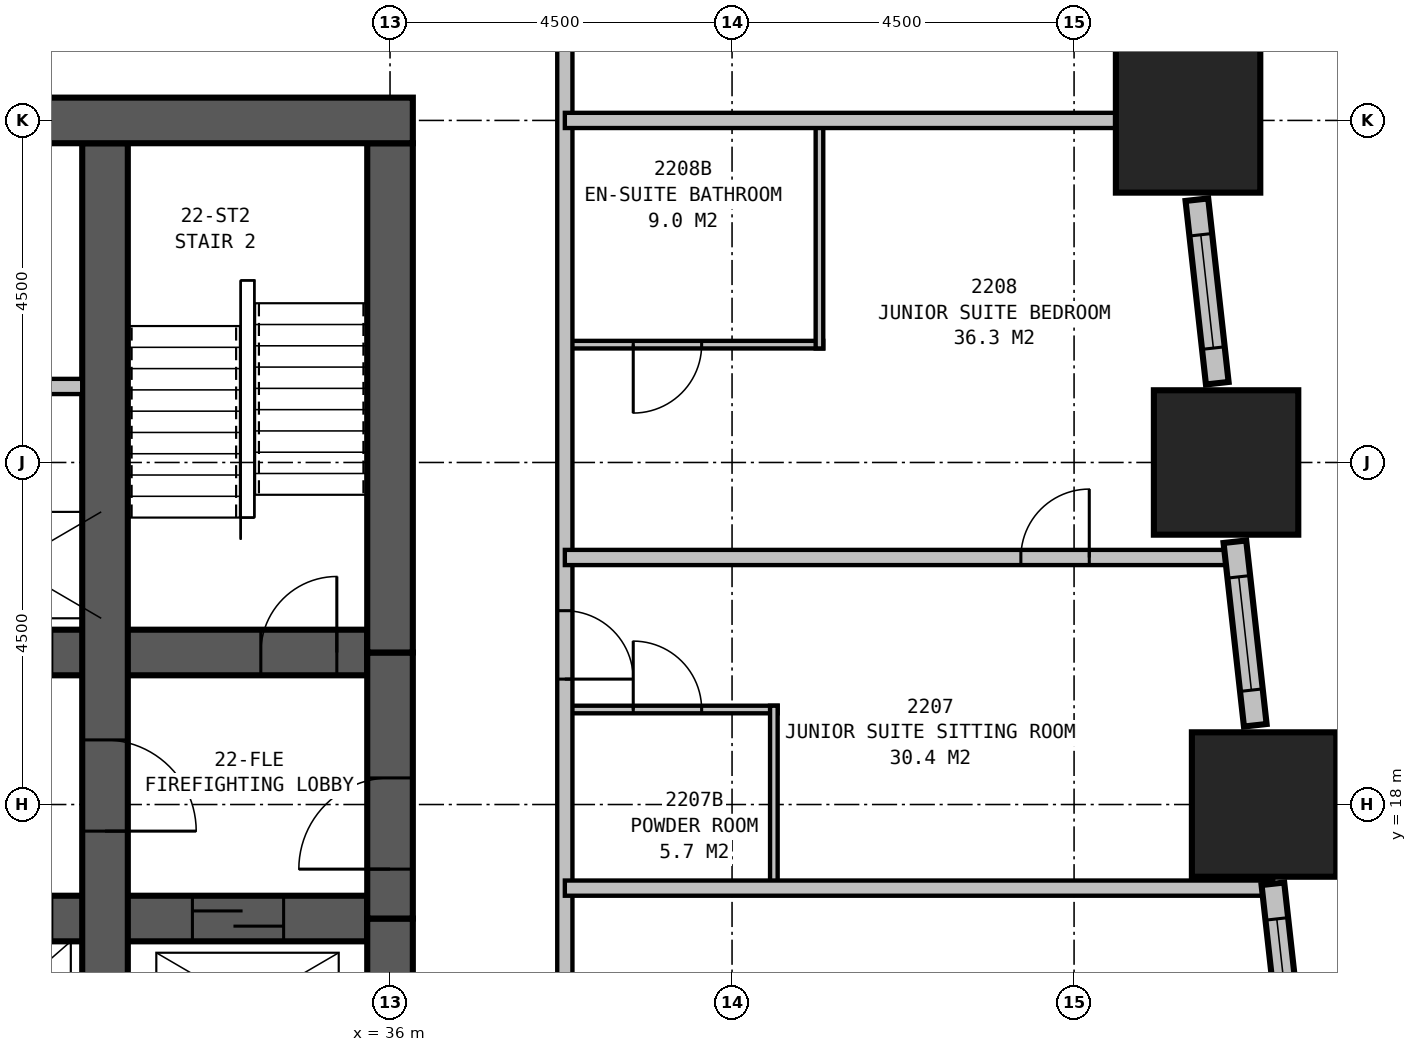
"""IFC4 building model, lengths in metres.
Left out: names, types, materials, properties, quantities, classifications, styles, units other than length and angle.
Written with IfcOpenShell. Run it as: python <this file> out.ifc"""

import sys

from ifc_helpers import new_model, si_unit, direction, frame, frame_2d, origin, origin_2d, place, context, subcontext, project, spatial, rectangle, extrude, element, fill, save


model = new_model("IFC4")
c1 = context("Model", 3, precision=1e-05, world=origin(), true_north=direction((0.0, 1.0)))
c2 = subcontext(c1, "Body", "Model", "MODEL_VIEW")
j1 = project(units=[si_unit("LENGTHUNIT", "METRE"), si_unit("PLANEANGLEUNIT", "RADIAN")], contexts=[c1])
p1 = place(None, origin())
s1 = spatial("IfcSite", under=j1, at=p1, CompositionType="ELEMENT")
p2 = place(p1, origin())
s2 = spatial("IfcBuilding", under=s1, at=p2, CompositionType="ELEMENT")
p3 = place(p2, frame((0.0, 0.0, 89.9)))
s3 = spatial("IfcBuildingStorey", under=s2, at=p3, CompositionType="ELEMENT", Elevation=89.9)
for number, where, z_axis, x_axis in (
    (1, (47.5, 18.0, 0.0), (0.0, 0.0, 1.0), (1.0, 0.0, 0.0)),
    (2, (47.0, 22.5, 0.0), (0.0, 0.0, 1.0), (1.0, 0.0, 0.0)),
    (3, (46.5, 27.0, 0.0), (0.0, 0.0, 1.0), (1.0, 0.0, 0.0)),
):
    element("IfcColumn", number, at=place(p3, frame(where, z_axis=z_axis, x_axis=x_axis)), inside=s3, PredefinedType="COLUMN", context=c2, shape_type="SweptSolid", body=[
        extrude(rectangle(XDim=1.9, YDim=1.9, at=origin_2d()), origin(), (0.0, 0.0, 1.0), 3.5),
    ])
p4 = place(p3, frame((36.3, 27.0, 0.0), z_axis=(0.0, 0.0, 1.0), x_axis=(-1.0, 0.0, 0.0)))
e4 = element("IfcWall", 4, at=p4, inside=s3, PredefinedType="SHEAR", context=c2, shape_type="SweptSolid", body=[
    extrude(rectangle(XDim=23.1, YDim=0.6, at=frame_2d((11.55, 0.0))), origin(), (0.0, 0.0, 1.0), 3.5),
])
p5 = place(p4, frame((17.05, 0.0, 0.0)))
e5 = element("IfcOpeningElement", 5, at=p5, cuts=e4, PredefinedType="OPENING", context=c2, shape_type="SweptSolid", body=[
    extrude(rectangle(XDim=1.0, YDim=2.1, at=frame_2d((0.5, 1.05))), frame((0.0, 0.31, 0.0), z_axis=(0.0, -1.0, 0.0), x_axis=(1.0, 0.0, 0.0)), (0.0, 0.0, 1.0), 0.62),
])
p6 = place(p4, frame((12.05, 0.0, 0.0)))
e6 = element("IfcOpeningElement", 6, at=p6, cuts=e4, PredefinedType="OPENING", context=c2, shape_type="SweptSolid", body=[
    extrude(rectangle(XDim=1.0, YDim=2.1, at=frame_2d((0.5, 1.05))), frame((0.0, 0.31, 0.0), z_axis=(0.0, -1.0, 0.0), x_axis=(1.0, 0.0, 0.0)), (0.0, 0.0, 1.0), 0.62),
])
p7 = place(p4, frame((7.05, 0.0, 0.0)))
e7 = element("IfcOpeningElement", 7, at=p7, cuts=e4, PredefinedType="OPENING", context=c2, shape_type="SweptSolid", body=[
    extrude(rectangle(XDim=1.0, YDim=2.1, at=frame_2d((0.5, 1.05))), frame((0.0, 0.31, 0.0), z_axis=(0.0, -1.0, 0.0), x_axis=(1.0, 0.0, 0.0)), (0.0, 0.0, 1.0), 0.62),
])
p8 = place(p3, frame((32.25, 13.8, 0.0), z_axis=(0.0, 0.0, 1.0), x_axis=(0.0, 1.0, 0.0)))
e8 = element("IfcWall", 8, at=p8, inside=s3, PredefinedType="SHEAR", context=c2, shape_type="SweptSolid", body=[
    extrude(rectangle(XDim=12.9, YDim=0.6, at=frame_2d((6.45, 0.0))), origin(), (0.0, 0.0, 1.0), 3.5),
])
p9 = place(p8, frame((5.05, 0.0, 0.0), z_axis=(0.0, 0.0, 1.0), x_axis=(-1.0, 0.0, 0.0)))
e9 = element("IfcOpeningElement", 9, at=p9, cuts=e8, PredefinedType="OPENING", context=c2, shape_type="SweptSolid", body=[
    extrude(rectangle(XDim=1.2, YDim=2.1, at=frame_2d((0.6, 1.05))), frame((0.0, 0.31, 0.0), z_axis=(0.0, -1.0, 0.0), x_axis=(1.0, 0.0, 0.0)), (0.0, 0.0, 1.0), 0.62),
])
p10 = place(p3, frame((13.8, 16.5, 0.0), z_axis=(0.0, 0.0, 1.0), x_axis=(1.0, 0.0, 0.0)))
e10 = element("IfcWall", 10, at=p10, inside=s3, PredefinedType="SHEAR", context=c2, shape_type="SweptSolid", body=[
    extrude(rectangle(XDim=21.9, YDim=0.6, at=frame_2d((10.95, 0.0))), origin(), (0.0, 0.0, 1.0), 3.5),
])
p11 = place(p10, frame((11.65, 0.0, 0.0)))
e11 = element("IfcOpeningElement", 11, at=p11, cuts=e10, PredefinedType="OPENING", context=c2, shape_type="SweptSolid", body=[
    extrude(rectangle(XDim=1.1, YDim=2.1, at=frame_2d((0.55, 1.05))), frame((0.0, 0.31, 0.0), z_axis=(0.0, -1.0, 0.0), x_axis=(1.0, 0.0, 0.0)), (0.0, 0.0, 1.0), 0.62),
])
p12 = place(p10, frame((14.15, 0.0, 0.0)))
e12 = element("IfcOpeningElement", 12, at=p12, cuts=e10, PredefinedType="OPENING", context=c2, shape_type="SweptSolid", body=[
    extrude(rectangle(XDim=1.1, YDim=2.1, at=frame_2d((0.55, 1.05))), frame((0.0, 0.31, 0.0), z_axis=(0.0, -1.0, 0.0), x_axis=(1.0, 0.0, 0.0)), (0.0, 0.0, 1.0), 0.62),
])
p13 = place(p10, frame((16.65, 0.0, 0.0)))
e13 = element("IfcOpeningElement", 13, at=p13, cuts=e10, PredefinedType="OPENING", context=c2, shape_type="SweptSolid", body=[
    extrude(rectangle(XDim=1.1, YDim=2.1, at=frame_2d((0.55, 1.05))), frame((0.0, 0.31, 0.0), z_axis=(0.0, -1.0, 0.0), x_axis=(1.0, 0.0, 0.0)), (0.0, 0.0, 1.0), 0.62),
])
p14 = place(p10, frame((5.75, 0.0, 0.0), z_axis=(0.0, 0.0, 1.0), x_axis=(-1.0, 0.0, 0.0)))
e14 = element("IfcOpeningElement", 14, at=p14, cuts=e10, PredefinedType="OPENING", context=c2, shape_type="SweptSolid", body=[
    extrude(rectangle(XDim=1.0, YDim=2.1, at=frame_2d((0.5, 1.05))), frame((0.0, 0.31, 0.0), z_axis=(0.0, -1.0, 0.0), x_axis=(1.0, 0.0, 0.0)), (0.0, 0.0, 1.0), 0.62),
])
p15 = place(p10, frame((10.2, 0.0, 0.0), z_axis=(0.0, 0.0, 1.0), x_axis=(-1.0, 0.0, 0.0)))
e15 = element("IfcOpeningElement", 15, at=p15, cuts=e10, PredefinedType="OPENING", context=c2, shape_type="SweptSolid", body=[
    extrude(rectangle(XDim=1.0, YDim=2.1, at=frame_2d((0.5, 1.05))), frame((0.0, 0.31, 0.0), z_axis=(0.0, -1.0, 0.0), x_axis=(1.0, 0.0, 0.0)), (0.0, 0.0, 1.0), 0.62),
])
p16 = place(p10, frame((0.6, 0.0, 0.0)))
e16 = element("IfcOpeningElement", 16, at=p16, cuts=e10, PredefinedType="OPENING", context=c2, shape_type="SweptSolid", body=[
    extrude(rectangle(XDim=1.2, YDim=2.1, at=frame_2d((0.6, 1.05))), frame((0.0, 0.31, 0.0), z_axis=(0.0, -1.0, 0.0), x_axis=(1.0, 0.0, 0.0)), (0.0, 0.0, 1.0), 0.62),
])
p17 = place(p10, frame((19.6, 0.0, 0.0)))
e17 = element("IfcOpeningElement", 17, at=p17, cuts=e10, PredefinedType="OPENING", context=c2, shape_type="SweptSolid", body=[
    extrude(rectangle(XDim=1.2, YDim=2.1, at=frame_2d((0.6, 1.05))), frame((0.0, 0.31, 0.0), z_axis=(0.0, -1.0, 0.0), x_axis=(1.0, 0.0, 0.0)), (0.0, 0.0, 1.0), 0.62),
])
p18 = place(p3, frame((13.8, 20.0, 0.0), z_axis=(0.0, 0.0, 1.0), x_axis=(1.0, 0.0, 0.0)))
e18 = element("IfcWall", 18, at=p18, inside=s3, PredefinedType="SHEAR", context=c2, shape_type="SweptSolid", body=[
    extrude(rectangle(XDim=21.9, YDim=0.6, at=frame_2d((10.95, 0.0))), origin(), (0.0, 0.0, 1.0), 3.5),
])
p19 = place(p18, frame((0.5, 0.0, 0.0)))
e19 = element("IfcOpeningElement", 19, at=p19, cuts=e18, PredefinedType="OPENING", context=c2, shape_type="SweptSolid", body=[
    extrude(rectangle(XDim=1.0, YDim=2.1, at=frame_2d((0.5, 1.05))), frame((0.0, 0.31, 0.0), z_axis=(0.0, -1.0, 0.0), x_axis=(1.0, 0.0, 0.0)), (0.0, 0.0, 1.0), 0.62),
])
p20 = place(p18, frame((20.5, 0.0, 0.0)))
e20 = element("IfcOpeningElement", 20, at=p20, cuts=e18, PredefinedType="OPENING", context=c2, shape_type="SweptSolid", body=[
    extrude(rectangle(XDim=1.0, YDim=2.1, at=frame_2d((0.5, 1.05))), frame((0.0, 0.31, 0.0), z_axis=(0.0, -1.0, 0.0), x_axis=(1.0, 0.0, 0.0)), (0.0, 0.0, 1.0), 0.62),
])
p21 = place(p18, frame((16.65, 0.0, 0.0)))
e21 = element("IfcOpeningElement", 21, at=p21, cuts=e18, PredefinedType="OPENING", context=c2, shape_type="SweptSolid", body=[
    extrude(rectangle(XDim=1.1, YDim=2.1, at=frame_2d((0.55, 1.05))), frame((0.0, 0.31, 0.0), z_axis=(0.0, -1.0, 0.0), x_axis=(1.0, 0.0, 0.0)), (0.0, 0.0, 1.0), 0.62),
])
p22 = place(p3, frame((36.0, 13.8, 0.0), z_axis=(0.0, 0.0, 1.0), x_axis=(0.0, 1.0, 0.0)))
e22 = element("IfcWall", 22, at=p22, inside=s3, PredefinedType="SHEAR", context=c2, shape_type="SweptSolid", body=[
    extrude(rectangle(XDim=2.7, YDim=0.6, at=frame_2d((1.35, 0.0))), origin(), (0.0, 0.0, 1.0), 3.5),
])
p23 = place(p3, frame((36.0, 16.5, 0.0), z_axis=(0.0, 0.0, 1.0), x_axis=(0.0, 1.0, 0.0)))
e23 = element("IfcWall", 23, at=p23, inside=s3, PredefinedType="SHEAR", context=c2, shape_type="SweptSolid", body=[
    extrude(rectangle(XDim=3.5, YDim=0.6, at=frame_2d((1.75, 0.0))), origin(), (0.0, 0.0, 1.0), 3.5),
])
p24 = place(p23, frame((0.65, 0.0, 0.0)))
e24 = element("IfcOpeningElement", 24, at=p24, cuts=e23, PredefinedType="OPENING", context=c2, shape_type="SweptSolid", body=[
    extrude(rectangle(XDim=1.2, YDim=2.1, at=frame_2d((0.6, 1.05))), frame((0.0, 0.31, 0.0), z_axis=(0.0, -1.0, 0.0), x_axis=(1.0, 0.0, 0.0)), (0.0, 0.0, 1.0), 0.62),
])
p25 = place(p3, frame((36.0, 20.0, 0.0), z_axis=(0.0, 0.0, 1.0), x_axis=(0.0, 1.0, 0.0)))
e25 = element("IfcWall", 25, at=p25, inside=s3, PredefinedType="SHEAR", context=c2, shape_type="SweptSolid", body=[
    extrude(rectangle(XDim=6.7, YDim=0.6, at=frame_2d((3.35, 0.0))), origin(), (0.0, 0.0, 1.0), 3.5),
])
p26 = place(p3, frame((47.884, 14.543, 0.0), z_axis=(0.0, 0.0, 1.0), x_axis=(-0.110343286306, 0.993893535127, 0.0)))
e26 = element("IfcWall", 26, at=p26, inside=s3, PredefinedType="STANDARD", context=c2, shape_type="SweptSolid", body=[
    extrude(rectangle(XDim=2.429, YDim=0.3, at=frame_2d((1.215, 0.0))), origin(), (0.0, 0.0, 1.0), 2.15),
])
p27 = place(p26, frame((0.465, 0.0, 0.5)))
e27 = element("IfcOpeningElement", 27, at=p27, cuts=e26, PredefinedType="OPENING", context=c2, shape_type="SweptSolid", body=[
    extrude(rectangle(XDim=1.5, YDim=1.5, at=frame_2d((0.75, 0.75))), frame((0.0, 0.16, 0.0), z_axis=(0.0, -1.0, 0.0), x_axis=(1.0, 0.0, 0.0)), (0.0, 0.0, 1.0), 0.32),
])
p28 = place(p3, frame((47.384, 19.043, 0.0), z_axis=(0.0, 0.0, 1.0), x_axis=(-0.110343286306, 0.993893535127, 0.0)))
e28 = element("IfcWall", 28, at=p28, inside=s3, PredefinedType="STANDARD", context=c2, shape_type="SweptSolid", body=[
    extrude(rectangle(XDim=2.429, YDim=0.3, at=frame_2d((1.215, 0.0))), origin(), (0.0, 0.0, 1.0), 2.15),
])
p29 = place(p28, frame((0.465, 0.0, 0.5)))
e29 = element("IfcOpeningElement", 29, at=p29, cuts=e28, PredefinedType="OPENING", context=c2, shape_type="SweptSolid", body=[
    extrude(rectangle(XDim=1.5, YDim=1.5, at=frame_2d((0.75, 0.75))), frame((0.0, 0.16, 0.0), z_axis=(0.0, -1.0, 0.0), x_axis=(1.0, 0.0, 0.0)), (0.0, 0.0, 1.0), 0.32),
])
p30 = place(p3, frame((46.884, 23.543, 0.0), z_axis=(0.0, 0.0, 1.0), x_axis=(-0.110343286306, 0.993893535127, 0.0)))
e30 = element("IfcWall", 30, at=p30, inside=s3, PredefinedType="STANDARD", context=c2, shape_type="SweptSolid", body=[
    extrude(rectangle(XDim=2.429, YDim=0.3, at=frame_2d((1.215, 0.0))), origin(), (0.0, 0.0, 1.0), 2.15),
])
p31 = place(p30, frame((0.465, 0.0, 0.5)))
e31 = element("IfcOpeningElement", 31, at=p31, cuts=e30, PredefinedType="OPENING", context=c2, shape_type="SweptSolid", body=[
    extrude(rectangle(XDim=1.5, YDim=1.5, at=frame_2d((0.75, 0.75))), frame((0.0, 0.16, 0.0), z_axis=(0.0, -1.0, 0.0), x_axis=(1.0, 0.0, 0.0)), (0.0, 0.0, 1.0), 0.32),
])
p32 = place(p3, frame((38.3, 10.6, 0.0), z_axis=(0.0, 0.0, 1.0), x_axis=(0.0, 1.0, 0.0)))
e32 = element("IfcWall", 32, at=p32, inside=s3, PredefinedType="PARTITIONING", context=c2, shape_type="SweptSolid", body=[
    extrude(rectangle(XDim=19.3, YDim=0.2, at=frame_2d((9.65, 0.0))), origin(), (0.0, 0.0, 1.0), 3.25),
])
p33 = place(p32, frame((4.65, 0.0, 0.0), z_axis=(0.0, 0.0, 1.0), x_axis=(-1.0, 0.0, 0.0)))
e33 = element("IfcOpeningElement", 33, at=p33, cuts=e32, PredefinedType="OPENING", context=c2, shape_type="SweptSolid", body=[
    extrude(rectangle(XDim=1.0, YDim=2.1, at=frame_2d((0.5, 1.05))), frame((0.0, 0.11, 0.0), z_axis=(0.0, -1.0, 0.0), x_axis=(1.0, 0.0, 0.0)), (0.0, 0.0, 1.0), 0.22),
])
p34 = place(p32, frame((9.95, 0.0, 0.0), z_axis=(0.0, 0.0, 1.0), x_axis=(-1.0, 0.0, 0.0)))
e34 = element("IfcOpeningElement", 34, at=p34, cuts=e32, PredefinedType="OPENING", context=c2, shape_type="SweptSolid", body=[
    extrude(rectangle(XDim=0.9, YDim=2.1, at=frame_2d((0.45, 1.05))), frame((0.0, 0.11, 0.0), z_axis=(0.0, -1.0, 0.0), x_axis=(1.0, 0.0, 0.0)), (0.0, 0.0, 1.0), 0.22),
])
p35 = place(p3, frame((38.3, 16.9, 0.0), z_axis=(0.0, 0.0, 1.0), x_axis=(1.0, 0.0, 0.0)))
e35 = element("IfcWall", 35, at=p35, inside=s3, PredefinedType="PARTITIONING", context=c2, shape_type="SweptSolid", body=[
    extrude(rectangle(XDim=9.321, YDim=0.2, at=frame_2d((4.661, 0.0))), origin(), (0.0, 0.0, 1.0), 3.25),
])
p36 = place(p3, frame((38.3, 21.25, 0.0), z_axis=(0.0, 0.0, 1.0), x_axis=(1.0, 0.0, 0.0)))
e36 = element("IfcWall", 36, at=p36, inside=s3, PredefinedType="PARTITIONING", context=c2, shape_type="SweptSolid", body=[
    extrude(rectangle(XDim=8.838, YDim=0.2, at=frame_2d((4.419, 0.0))), origin(), (0.0, 0.0, 1.0), 3.25),
])
p37 = place(p36, frame((6.0, 0.0, 0.0)))
e37 = element("IfcOpeningElement", 37, at=p37, cuts=e36, PredefinedType="OPENING", context=c2, shape_type="SweptSolid", body=[
    extrude(rectangle(XDim=0.9, YDim=2.1, at=frame_2d((0.45, 1.05))), frame((0.0, 0.11, 0.0), z_axis=(0.0, -1.0, 0.0), x_axis=(1.0, 0.0, 0.0)), (0.0, 0.0, 1.0), 0.22),
])
p38 = place(p3, frame((41.05, 16.9, 0.0), z_axis=(0.0, 0.0, 1.0), x_axis=(0.0, 1.0, 0.0)))
e38 = element("IfcWall", 38, at=p38, inside=s3, PredefinedType="PLUMBINGWALL", context=c2, shape_type="SweptSolid", body=[
    extrude(rectangle(XDim=2.4, YDim=0.1, at=frame_2d((1.2, 0.0))), origin(), (0.0, 0.0, 1.0), 3.25),
])
p39 = place(p3, frame((38.3, 19.25, 0.0), z_axis=(0.0, 0.0, 1.0), x_axis=(1.0, 0.0, 0.0)))
e39 = element("IfcWall", 39, at=p39, inside=s3, PredefinedType="PLUMBINGWALL", context=c2, shape_type="SweptSolid", body=[
    extrude(rectangle(XDim=2.8, YDim=0.1, at=frame_2d((1.4, 0.0))), origin(), (0.0, 0.0, 1.0), 3.25),
])
p40 = place(p39, frame((0.9, 0.0, 0.0)))
e40 = element("IfcOpeningElement", 40, at=p40, cuts=e39, PredefinedType="OPENING", context=c2, shape_type="SweptSolid", body=[
    extrude(rectangle(XDim=0.9, YDim=2.1, at=frame_2d((0.45, 1.05))), frame((0.0, 0.06, 0.0), z_axis=(0.0, -1.0, 0.0), x_axis=(1.0, 0.0, 0.0)), (0.0, 0.0, 1.0), 0.12),
])
p41 = place(p3, frame((41.65, 24.0, 0.0), z_axis=(0.0, 0.0, 1.0), x_axis=(0.0, 1.0, 0.0)))
e41 = element("IfcWall", 41, at=p41, inside=s3, PredefinedType="PLUMBINGWALL", context=c2, shape_type="SweptSolid", body=[
    extrude(rectangle(XDim=3.0, YDim=0.1, at=frame_2d((1.5, 0.0))), origin(), (0.0, 0.0, 1.0), 3.25),
])
p42 = place(p3, frame((38.3, 24.05, 0.0), z_axis=(0.0, 0.0, 1.0), x_axis=(1.0, 0.0, 0.0)))
e42 = element("IfcWall", 42, at=p42, inside=s3, PredefinedType="PLUMBINGWALL", context=c2, shape_type="SweptSolid", body=[
    extrude(rectangle(XDim=3.4, YDim=0.1, at=frame_2d((1.7, 0.0))), origin(), (0.0, 0.0, 1.0), 3.25),
])
p43 = place(p42, frame((1.8, 0.0, 0.0), z_axis=(0.0, 0.0, 1.0), x_axis=(-1.0, 0.0, 0.0)))
e43 = element("IfcOpeningElement", 43, at=p43, cuts=e42, PredefinedType="OPENING", context=c2, shape_type="SweptSolid", body=[
    extrude(rectangle(XDim=0.9, YDim=2.1, at=frame_2d((0.45, 1.05))), frame((0.0, 0.06, 0.0), z_axis=(0.0, -1.0, 0.0), x_axis=(1.0, 0.0, 0.0)), (0.0, 0.0, 1.0), 0.12),
])
p44 = place(p3, frame((38.3, 27.0, 0.0), z_axis=(0.0, 0.0, 1.0), x_axis=(1.0, 0.0, 0.0)))
e44 = element("IfcWall", 44, at=p44, inside=s3, PredefinedType="PARTITIONING", context=c2, shape_type="SweptSolid", body=[
    extrude(rectangle(XDim=7.977, YDim=0.2, at=frame_2d((3.988, 0.0))), origin(), (0.0, 0.0, 1.0), 1.95),
])
p45 = place(p3, frame((17.55, 23.5, 0.0), z_axis=(0.0, 0.0, 1.0), x_axis=(1.0, 0.0, 0.0)))
e45 = element("IfcWall", 45, at=p45, inside=s3, PredefinedType="PARTITIONING", context=c2, shape_type="SweptSolid", body=[
    extrude(rectangle(XDim=14.4, YDim=0.2, at=frame_2d((7.2, 0.0))), origin(), (0.0, 0.0, 1.0), 3.25),
])
p46 = place(p45, frame((6.45, 0.0, 0.0), z_axis=(0.0, 0.0, 1.0), x_axis=(-1.0, 0.0, 0.0)))
e46 = element("IfcOpeningElement", 46, at=p46, cuts=e45, PredefinedType="OPENING", context=c2, shape_type="SweptSolid", body=[
    extrude(rectangle(XDim=1.0, YDim=2.1, at=frame_2d((0.5, 1.05))), frame((0.0, 0.11, 0.0), z_axis=(0.0, -1.0, 0.0), x_axis=(1.0, 0.0, 0.0)), (0.0, 0.0, 1.0), 0.22),
])
p47 = place(p45, frame((7.95, 0.0, 0.0)))
e47 = element("IfcOpeningElement", 47, at=p47, cuts=e45, PredefinedType="OPENING", context=c2, shape_type="SweptSolid", body=[
    extrude(rectangle(XDim=1.0, YDim=2.1, at=frame_2d((0.5, 1.05))), frame((0.0, 0.11, 0.0), z_axis=(0.0, -1.0, 0.0), x_axis=(1.0, 0.0, 0.0)), (0.0, 0.0, 1.0), 0.22),
])
p48 = place(p27, origin())
e48 = element("IfcWindow", 48, at=p48, inside=s3, PartitioningType="SINGLE_PANEL", PredefinedType="WINDOW", context=c2, shape_type="SweptSolid", body=[
    extrude(rectangle(XDim=1.5, YDim=1.5, at=frame_2d((0.75, 0.75))), frame((0.0, 0.03, 0.0), z_axis=(0.0, -1.0, 0.0), x_axis=(1.0, 0.0, 0.0)), (0.0, 0.0, 1.0), 0.06),
])
fill(e27, e48)
p49 = place(p29, origin())
e49 = element("IfcWindow", 49, at=p49, inside=s3, PartitioningType="SINGLE_PANEL", PredefinedType="WINDOW", context=c2, shape_type="SweptSolid", body=[
    extrude(rectangle(XDim=1.5, YDim=1.5, at=frame_2d((0.75, 0.75))), frame((0.0, 0.03, 0.0), z_axis=(0.0, -1.0, 0.0), x_axis=(1.0, 0.0, 0.0)), (0.0, 0.0, 1.0), 0.06),
])
fill(e29, e49)
p50 = place(p31, origin())
e50 = element("IfcWindow", 50, at=p50, inside=s3, PartitioningType="SINGLE_PANEL", PredefinedType="WINDOW", context=c2, shape_type="SweptSolid", body=[
    extrude(rectangle(XDim=1.5, YDim=1.5, at=frame_2d((0.75, 0.75))), frame((0.0, 0.03, 0.0), z_axis=(0.0, -1.0, 0.0), x_axis=(1.0, 0.0, 0.0)), (0.0, 0.0, 1.0), 0.06),
])
fill(e31, e50)
p51 = place(p34, origin())
e51 = element("IfcDoor", 51, at=p51, inside=s3, OperationType="SINGLE_SWING_RIGHT", PredefinedType="DOOR", context=c2, shape_type="SweptSolid", body=[
    extrude(rectangle(XDim=0.9, YDim=2.1, at=frame_2d((0.45, 1.05))), frame((0.0, 0.025, 0.0), z_axis=(0.0, -1.0, 0.0), x_axis=(1.0, 0.0, 0.0)), (0.0, 0.0, 1.0), 0.05),
])
fill(e34, e51)
p52 = place(p37, origin())
e52 = element("IfcDoor", 52, at=p52, inside=s3, OperationType="SINGLE_SWING_RIGHT", PredefinedType="DOOR", context=c2, shape_type="SweptSolid", body=[
    extrude(rectangle(XDim=0.9, YDim=2.1, at=frame_2d((0.45, 1.05))), frame((0.0, 0.025, 0.0), z_axis=(0.0, -1.0, 0.0), x_axis=(1.0, 0.0, 0.0)), (0.0, 0.0, 1.0), 0.05),
])
fill(e37, e52)
p53 = place(p40, origin())
e53 = element("IfcDoor", 53, at=p53, inside=s3, OperationType="SINGLE_SWING_LEFT", PredefinedType="DOOR", context=c2, shape_type="SweptSolid", body=[
    extrude(rectangle(XDim=0.9, YDim=2.1, at=frame_2d((0.45, 1.05))), frame((0.0, 0.025, 0.0), z_axis=(0.0, -1.0, 0.0), x_axis=(1.0, 0.0, 0.0)), (0.0, 0.0, 1.0), 0.05),
])
fill(e40, e53)
p54 = place(p43, origin())
e54 = element("IfcDoor", 54, at=p54, inside=s3, OperationType="SINGLE_SWING_RIGHT", PredefinedType="DOOR", context=c2, shape_type="SweptSolid", body=[
    extrude(rectangle(XDim=0.9, YDim=2.1, at=frame_2d((0.45, 1.05))), frame((0.0, 0.025, 0.0), z_axis=(0.0, -1.0, 0.0), x_axis=(1.0, 0.0, 0.0)), (0.0, 0.0, 1.0), 0.05),
])
fill(e43, e54)
p55 = place(p24, origin())
e55 = element("IfcDoor", 55, at=p55, inside=s3, OperationType="SINGLE_SWING_LEFT", PredefinedType="DOOR", context=c2, shape_type="SweptSolid", body=[
    extrude(rectangle(XDim=1.2, YDim=2.1, at=frame_2d((0.6, 1.05))), frame((0.0, 0.3, 0.0), z_axis=(0.0, -1.0, 0.0), x_axis=(1.0, 0.0, 0.0)), (0.0, 0.0, 1.0), 0.6),
])
fill(e24, e55)
p56 = place(p9, origin())
e56 = element("IfcDoor", 56, at=p56, inside=s3, OperationType="SINGLE_SWING_RIGHT", PredefinedType="DOOR", context=c2, shape_type="SweptSolid", body=[
    extrude(rectangle(XDim=1.2, YDim=2.1, at=frame_2d((0.6, 1.05))), frame((0.0, 0.3, 0.0), z_axis=(0.0, -1.0, 0.0), x_axis=(1.0, 0.0, 0.0)), (0.0, 0.0, 1.0), 0.6),
])
fill(e9, e56)
p57 = place(p20, origin())
e57 = element("IfcDoor", 57, at=p57, inside=s3, OperationType="SINGLE_SWING_RIGHT", PredefinedType="DOOR", context=c2, shape_type="SweptSolid", body=[
    extrude(rectangle(XDim=1.0, YDim=2.1, at=frame_2d((0.5, 1.05))), frame((0.0, 0.3, 0.0), z_axis=(0.0, -1.0, 0.0), x_axis=(1.0, 0.0, 0.0)), (0.0, 0.0, 1.0), 0.6),
])
fill(e20, e57)
p58 = place(p17, origin())
e58 = element("IfcDoor", 58, at=p58, inside=s3, OperationType="SLIDING_TO_LEFT", PredefinedType="DOOR", context=c2, shape_type="SweptSolid", body=[
    extrude(rectangle(XDim=1.2, YDim=2.1, at=frame_2d((0.6, 1.05))), frame((0.0, 0.3, 0.0), z_axis=(0.0, -1.0, 0.0), x_axis=(1.0, 0.0, 0.0)), (0.0, 0.0, 1.0), 0.6),
])
fill(e17, e58)
save(model, sys.argv[1])
